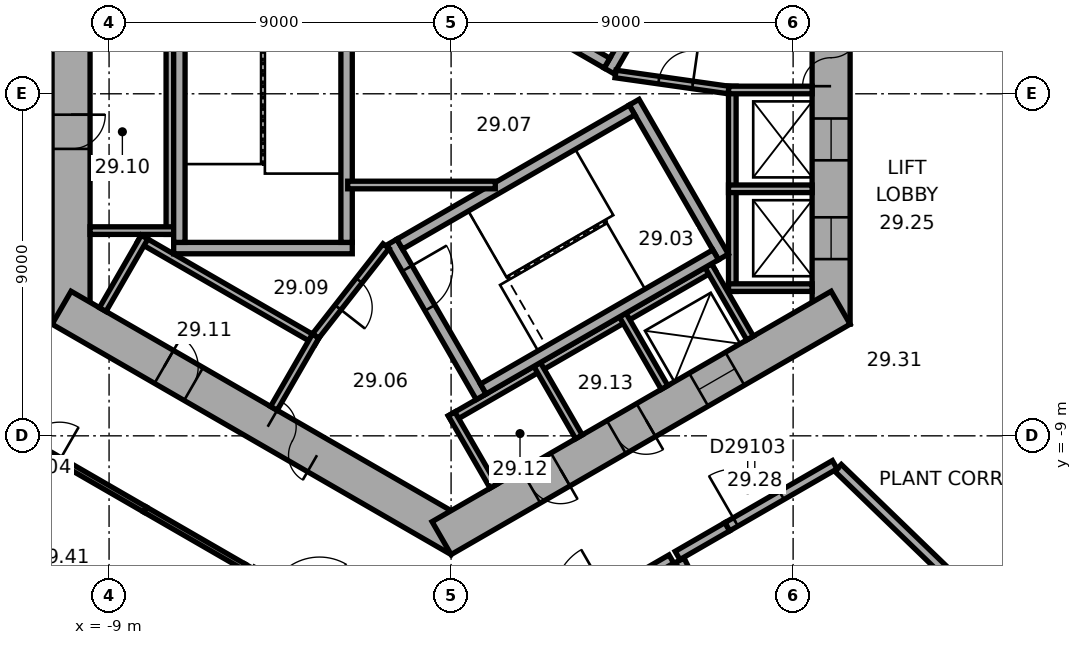
"""IFC4 building model, lengths in metres.
Left out: names, types, materials, properties, quantities, classifications, styles, units other than length and angle.
Written with IfcOpenShell. Run it as: python <this file> out.ifc"""

import sys

from ifc_helpers import new_model, si_unit, direction, frame, frame_2d, origin, place, context, subcontext, project, spatial, rectangle, extrude, element, fill, save


model = new_model("IFC4")
c1 = context("Model", 3, precision=1e-05, world=origin(), true_north=direction((0.0, 1.0)))
c2 = subcontext(c1, "Body", "Model", "MODEL_VIEW")
j1 = project(units=[si_unit("LENGTHUNIT", "METRE"), si_unit("PLANEANGLEUNIT", "RADIAN")], contexts=[c1])
p1 = place(None, origin())
s1 = spatial("IfcSite", under=j1, at=p1, CompositionType="ELEMENT")
p2 = place(p1, origin())
s2 = spatial("IfcBuilding", under=s1, at=p2, CompositionType="ELEMENT")
p3 = place(p2, frame((0.0, 0.0, 119.9)))
s3 = spatial("IfcBuildingStorey", under=s2, at=p3, CompositionType="ELEMENT", Elevation=119.9)
p4 = place(p3, frame((10.0, -6.062, 0.0), z_axis=(0.0, 0.0, 1.0), x_axis=(0.0, 1.0, 0.0)))
e1 = element("IfcWall", 1, at=p4, inside=s3, PredefinedType="SHEAR", context=c2, shape_type="SweptSolid", body=[
    extrude(rectangle(XDim=12.125, YDim=1.0, at=frame_2d((6.062, 0.0))), origin(), (0.0, 0.0, 1.0), 4.5),
])
p5 = place(p4, frame((6.262, 0.0, 0.0)))
e2 = element("IfcOpeningElement", 2, at=p5, cuts=e1, PredefinedType="OPENING", context=c2, shape_type="SweptSolid", body=[
    extrude(rectangle(XDim=1.5, YDim=2.1, at=frame_2d((0.75, 1.05))), frame((0.0, 0.51, 0.0), z_axis=(0.0, -1.0, 0.0), x_axis=(1.0, 0.0, 0.0)), (0.0, 0.0, 1.0), 1.02),
])
p6 = place(p4, frame((1.712, 0.0, 0.0)))
e3 = element("IfcOpeningElement", 3, at=p6, cuts=e1, PredefinedType="OPENING", context=c2, shape_type="SweptSolid", body=[
    extrude(rectangle(XDim=1.1, YDim=2.1, at=frame_2d((0.55, 1.05))), frame((0.0, 0.51, 0.0), z_axis=(0.0, -1.0, 0.0), x_axis=(1.0, 0.0, 0.0)), (0.0, 0.0, 1.0), 1.02),
])
p7 = place(p4, frame((4.312, 0.0, 0.0)))
e4 = element("IfcOpeningElement", 4, at=p7, cuts=e1, PredefinedType="OPENING", context=c2, shape_type="SweptSolid", body=[
    extrude(rectangle(XDim=1.1, YDim=2.1, at=frame_2d((0.55, 1.05))), frame((0.0, 0.51, 0.0), z_axis=(0.0, -1.0, 0.0), x_axis=(1.0, 0.0, 0.0)), (0.0, 0.0, 1.0), 1.02),
])
p8 = place(p3, frame((-10.0, 6.062, 0.0), z_axis=(0.0, 0.0, 1.0), x_axis=(0.0, -1.0, 0.0)))
e5 = element("IfcWall", 5, at=p8, inside=s3, PredefinedType="SHEAR", context=c2, shape_type="SweptSolid", body=[
    extrude(rectangle(XDim=12.125, YDim=1.0, at=frame_2d((6.062, 0.0))), origin(), (0.0, 0.0, 1.0), 4.5),
])
p9 = place(p8, frame((6.612, 0.0, 0.0)))
e6 = element("IfcOpeningElement", 6, at=p9, cuts=e5, PredefinedType="OPENING", context=c2, shape_type="SweptSolid", body=[
    extrude(rectangle(XDim=0.9, YDim=2.1, at=frame_2d((0.45, 1.05))), frame((0.0, 0.51, 0.0), z_axis=(0.0, -1.0, 0.0), x_axis=(1.0, 0.0, 0.0)), (0.0, 0.0, 1.0), 1.02),
])
p10 = place(p3, frame((-10.25, -5.629, 0.0), z_axis=(0.0, 0.0, 1.0), x_axis=(0.866022616891, -0.50000482701, 0.0)))
e7 = element("IfcWall", 7, at=p10, inside=s3, PredefinedType="SHEAR", context=c2, shape_type="SweptSolid", body=[
    extrude(rectangle(XDim=12.125, YDim=1.0, at=frame_2d((6.062, 0.0))), origin(), (0.0, 0.0, 1.0), 4.5),
])
p11 = place(p10, frame((6.262, 0.0, 0.0)))
e8 = element("IfcOpeningElement", 8, at=p11, cuts=e7, PredefinedType="OPENING", context=c2, shape_type="SweptSolid", body=[
    extrude(rectangle(XDim=1.5, YDim=2.1, at=frame_2d((0.75, 1.05))), frame((0.0, 0.51, 0.0), z_axis=(0.0, -1.0, 0.0), x_axis=(1.0, 0.0, 0.0)), (0.0, 0.0, 1.0), 1.02),
])
p12 = place(p10, frame((3.112, 0.0, 0.0)))
e9 = element("IfcOpeningElement", 9, at=p12, cuts=e7, PredefinedType="OPENING", context=c2, shape_type="SweptSolid", body=[
    extrude(rectangle(XDim=0.9, YDim=2.1, at=frame_2d((0.45, 1.05))), frame((0.0, 0.51, 0.0), z_axis=(0.0, -1.0, 0.0), x_axis=(1.0, 0.0, 0.0)), (0.0, 0.0, 1.0), 1.02),
])
p13 = place(p3, frame((-0.25, -11.691, 0.0), z_axis=(0.0, 0.0, 1.0), x_axis=(0.866022616891, 0.50000482701, 0.0)))
e10 = element("IfcWall", 10, at=p13, inside=s3, PredefinedType="SHEAR", context=c2, shape_type="SweptSolid", body=[
    extrude(rectangle(XDim=12.125, YDim=1.0, at=frame_2d((6.062, 0.0))), origin(), (0.0, 0.0, 1.0), 4.5),
])
p14 = place(p13, frame((2.712, 0.0, 0.0)))
e11 = element("IfcOpeningElement", 11, at=p14, cuts=e10, PredefinedType="OPENING", context=c2, shape_type="SweptSolid", body=[
    extrude(rectangle(XDim=0.9, YDim=2.1, at=frame_2d((0.45, 1.05))), frame((0.0, 0.51, 0.0), z_axis=(0.0, -1.0, 0.0), x_axis=(1.0, 0.0, 0.0)), (0.0, 0.0, 1.0), 1.02),
])
p15 = place(p13, frame((5.312, 0.0, 0.0)))
e12 = element("IfcOpeningElement", 12, at=p15, cuts=e10, PredefinedType="OPENING", context=c2, shape_type="SweptSolid", body=[
    extrude(rectangle(XDim=0.9, YDim=2.1, at=frame_2d((0.45, 1.05))), frame((0.0, 0.51, 0.0), z_axis=(0.0, -1.0, 0.0), x_axis=(1.0, 0.0, 0.0)), (0.0, 0.0, 1.0), 1.02),
])
p16 = place(p13, frame((7.812, 0.0, 0.0)))
e13 = element("IfcOpeningElement", 13, at=p16, cuts=e10, PredefinedType="OPENING", context=c2, shape_type="SweptSolid", body=[
    extrude(rectangle(XDim=1.1, YDim=2.1, at=frame_2d((0.55, 1.05))), frame((0.0, 0.51, 0.0), z_axis=(0.0, -1.0, 0.0), x_axis=(1.0, 0.0, 0.0)), (0.0, 0.0, 1.0), 1.02),
])
p17 = place(p3, frame((7.4, -5.2, 0.0), z_axis=(0.0, 0.0, 1.0), x_axis=(0.0, 1.0, 0.0)))
e14 = element("IfcWall", 14, at=p17, inside=s3, PredefinedType="PARTITIONING", context=c2, shape_type="SweptSolid", body=[
    extrude(rectangle(XDim=5.4, YDim=0.2, at=frame_2d((2.7, 0.0))), origin(), (0.0, 0.0, 1.0), 4.22),
])
for number, where, z_axis, x_axis in (
    (15, (7.3, -5.1, 0.0), (0.0, 0.0, 1.0), (1.0, 0.0, 0.0)),
    (16, (7.3, -2.5, 0.0), (0.0, 0.0, 1.0), (1.0, 0.0, 0.0)),
    (17, (7.3, 0.1, 0.0), (0.0, 0.0, 1.0), (1.0, 0.0, 0.0)),
):
    element("IfcWall", number, at=place(p3, frame(where, z_axis=z_axis, x_axis=x_axis)), inside=s3, PredefinedType="PARTITIONING", context=c2, shape_type="SweptSolid", body=[
        extrude(rectangle(XDim=2.2, YDim=0.2, at=frame_2d((1.1, 0.0))), origin(), (0.0, 0.0, 1.0), 4.22),
    ])
p18 = place(p3, frame((-7.4, 4.3, 0.0), z_axis=(0.0, 0.0, 1.0), x_axis=(0.0, -1.0, 0.0)))
e18 = element("IfcWall", 18, at=p18, inside=s3, PredefinedType="PARTITIONING", context=c2, shape_type="SweptSolid", body=[
    extrude(rectangle(XDim=8.0, YDim=0.2, at=frame_2d((4.0, 0.0))), origin(), (0.0, 0.0, 1.0), 4.22),
])
p19 = place(p3, frame((-7.3, -3.6, 0.0), z_axis=(0.0, 0.0, 1.0), x_axis=(-1.0, 0.0, 0.0)))
e19 = element("IfcWall", 19, at=p19, inside=s3, PredefinedType="PARTITIONING", context=c2, shape_type="SweptSolid", body=[
    extrude(rectangle(XDim=2.2, YDim=0.2, at=frame_2d((1.1, 0.0))), origin(), (0.0, 0.0, 1.0), 4.22),
])
p20 = place(p3, frame((-8.203, -3.809, 0.0), z_axis=(0.0, 0.0, 1.0), x_axis=(0.866028230842, -0.499995103361, 0.0)))
e20 = element("IfcWall", 20, at=p20, inside=s3, PredefinedType="PARTITIONING", context=c2, shape_type="SweptSolid", body=[
    extrude(rectangle(XDim=5.4, YDim=0.2, at=frame_2d((2.7, 0.0))), origin(), (0.0, 0.0, 1.0), 4.22),
])
p21 = place(p3, frame((-8.067, -3.772, 0.0), z_axis=(0.0, 0.0, 1.0), x_axis=(-0.50002983664, -0.866008176907, 0.0)))
e21 = element("IfcWall", 21, at=p21, inside=s3, PredefinedType="PARTITIONING", context=c2, shape_type="SweptSolid", body=[
    extrude(rectangle(XDim=2.2, YDim=0.2, at=frame_2d((1.1, 0.0))), origin(), (0.0, 0.0, 1.0), 4.22),
])
p22 = place(p3, frame((-3.563, -6.372, 0.0), z_axis=(0.0, 0.0, 1.0), x_axis=(-0.499994660107, -0.866028486751, 0.0)))
e22 = element("IfcWall", 22, at=p22, inside=s3, PredefinedType="PARTITIONING", context=c2, shape_type="SweptSolid", body=[
    extrude(rectangle(XDim=2.2, YDim=0.2, at=frame_2d((1.1, 0.0))), origin(), (0.0, 0.0, 1.0), 4.22),
])
p23 = place(p3, frame((-0.024, -8.559, 0.0), z_axis=(0.0, 0.0, 1.0), x_axis=(0.866026010844, 0.49999894854, 0.0)))
e23 = element("IfcWall", 23, at=p23, inside=s3, PredefinedType="PARTITIONING", context=c2, shape_type="SweptSolid", body=[
    extrude(rectangle(XDim=8.0, YDim=0.2, at=frame_2d((4.0, 0.0))), origin(), (0.0, 0.0, 1.0), 4.22),
])
for number, where, z_axis, x_axis in (
    (24, (0.013, -8.422, 0.0), (0.0, 0.0, 1.0), (0.5, -0.866, 0.0)),
    (25, (2.264, -7.122, 0.0), (0.0, 0.0, 1.0), (0.5, -0.866, 0.0)),
    (26, (4.516, -5.822, 0.0), (0.0, 0.0, 1.0), (0.5, -0.866, 0.0)),
    (27, (6.768, -4.522, 0.0), (0.0, 0.0, 1.0), (0.5, -0.866, 0.0)),
):
    element("IfcWall", number, at=place(p3, frame(where, z_axis=z_axis, x_axis=x_axis)), inside=s3, PredefinedType="PARTITIONING", context=c2, shape_type="SweptSolid", body=[
        extrude(rectangle(XDim=2.2, YDim=0.2, at=frame_2d((1.1, 0.0))), origin(), (0.0, 0.0, 1.0), 4.22),
    ])
p24 = place(p3, frame((4.158, 0.602, 0.0), z_axis=(0.0, 0.0, 1.0), x_axis=(0.499977259774, 0.866038532462, 0.0)))
e28 = element("IfcWall", 28, at=p24, inside=s3, PredefinedType="SHEAR", context=c2, shape_type="SweptSolid", body=[
    extrude(rectangle(XDim=4.7, YDim=0.3, at=frame_2d((2.35, 0.0))), origin(), (0.0, 0.0, 1.0), 4.22),
])
p25 = place(p24, frame((0.8, 0.0, 0.0)))
e29 = element("IfcOpeningElement", 29, at=p25, cuts=e28, PredefinedType="OPENING", context=c2, shape_type="SweptSolid", body=[
    extrude(rectangle(XDim=1.2, YDim=2.1, at=frame_2d((0.6, 1.05))), frame((0.0, 0.16, 0.0), z_axis=(0.0, -1.0, 0.0), x_axis=(1.0, 0.0, 0.0)), (0.0, 0.0, 1.0), 0.32),
])
p26 = place(p3, frame((4.103, 0.807, 0.0), z_axis=(0.0, 0.0, 1.0), x_axis=(-0.866027801685, 0.499995846692, 0.0)))
e30 = element("IfcWall", 30, at=p26, inside=s3, PredefinedType="SHEAR", context=c2, shape_type="SweptSolid", body=[
    extrude(rectangle(XDim=7.06, YDim=0.3, at=frame_2d((3.53, 0.0))), origin(), (0.0, 0.0, 1.0), 4.22),
])
p27 = place(p3, frame((-2.6, -4.06, 0.0), z_axis=(0.0, 0.0, 1.0), x_axis=(-1.0, 0.0, 0.0)))
e31 = element("IfcWall", 31, at=p27, inside=s3, PredefinedType="SHEAR", context=c2, shape_type="SweptSolid", body=[
    extrude(rectangle(XDim=4.7, YDim=0.3, at=frame_2d((2.35, 0.0))), origin(), (0.0, 0.0, 1.0), 4.22),
])
for number, where, z_axis, x_axis in (
    (32, (-2.75, 3.15, 0.0), (0.0, 0.0, 1.0), (0.0, -1.0, 0.0)),
    (33, (-7.15, 3.15, 0.0), (0.0, 0.0, 1.0), (0.0, -1.0, 0.0)),
):
    element("IfcWall", number, at=place(p3, frame(where, z_axis=z_axis, x_axis=x_axis)), inside=s3, PredefinedType="SHEAR", context=c2, shape_type="SweptSolid", body=[
        extrude(rectangle(XDim=7.06, YDim=0.3, at=frame_2d((3.53, 0.0))), origin(), (0.0, 0.0, 1.0), 4.22),
    ])
p28 = place(p3, frame((-1.558, -3.902, 0.0), z_axis=(0.0, 0.0, 1.0), x_axis=(0.499977259774, -0.866038532462, 0.0)))
e34 = element("IfcWall", 34, at=p28, inside=s3, PredefinedType="SHEAR", context=c2, shape_type="SweptSolid", body=[
    extrude(rectangle(XDim=4.7, YDim=0.3, at=frame_2d((2.35, 0.0))), origin(), (0.0, 0.0, 1.0), 4.22),
])
p29 = place(p28, frame((0.8, 0.0, 0.0)))
e35 = element("IfcOpeningElement", 35, at=p29, cuts=e34, PredefinedType="OPENING", context=c2, shape_type="SweptSolid", body=[
    extrude(rectangle(XDim=1.2, YDim=2.1, at=frame_2d((0.6, 1.05))), frame((0.0, 0.16, 0.0), z_axis=(0.0, -1.0, 0.0), x_axis=(1.0, 0.0, 0.0)), (0.0, 0.0, 1.0), 0.32),
])
p30 = place(p3, frame((4.816, -0.222, 0.0), z_axis=(0.0, 0.0, 1.0), x_axis=(0.499977259774, -0.866038532462, 0.0)))
e36 = element("IfcWall", 36, at=p30, inside=s3, PredefinedType="SHEAR", context=c2, shape_type="SweptSolid", body=[
    extrude(rectangle(XDim=4.7, YDim=0.3, at=frame_2d((2.35, 0.0))), origin(), (0.0, 0.0, 1.0), 4.22),
])
for number, where, z_axis, x_axis in (
    (37, (-1.353, -3.957, 0.0), (0.0, 0.0, 1.0), (0.866, 0.5, 0.0)),
    (38, (0.847, -7.767, 0.0), (0.0, 0.0, 1.0), (0.866, 0.5, 0.0)),
):
    element("IfcWall", number, at=place(p3, frame(where, z_axis=z_axis, x_axis=x_axis)), inside=s3, PredefinedType="SHEAR", context=c2, shape_type="SweptSolid", body=[
        extrude(rectangle(XDim=7.06, YDim=0.3, at=frame_2d((3.53, 0.0))), origin(), (0.0, 0.0, 1.0), 4.22),
    ])
p31 = place(p3, frame((4.327, 0.521, 0.0), z_axis=(0.0, 0.0, 1.0), x_axis=(0.990124376366, -0.14019172346, 0.0)))
e39 = element("IfcWall", 39, at=p31, inside=s3, PredefinedType="PARTITIONING", context=c2, shape_type="SweptSolid", body=[
    extrude(rectangle(XDim=3.002, YDim=0.2, at=frame_2d((1.501, 0.0))), origin(), (0.0, 0.0, 1.0), 4.22),
])
p32 = place(p31, frame((1.15, 0.0, 0.0)))
e40 = element("IfcOpeningElement", 40, at=p32, cuts=e39, PredefinedType="OPENING", context=c2, shape_type="SweptSolid", body=[
    extrude(rectangle(XDim=0.9, YDim=2.1, at=frame_2d((0.45, 1.05))), frame((0.0, 0.11, 0.0), z_axis=(0.0, -1.0, 0.0), x_axis=(1.0, 0.0, 0.0)), (0.0, 0.0, 1.0), 0.22),
])
p33 = place(p3, frame((-1.712, -4.008, 0.0), z_axis=(0.0, 0.0, 1.0), x_axis=(-0.616549420702, -0.787316208287, 0.0)))
e41 = element("IfcWall", 41, at=p33, inside=s3, PredefinedType="PARTITIONING", context=c2, shape_type="SweptSolid", body=[
    extrude(rectangle(XDim=3.002, YDim=0.2, at=frame_2d((1.501, 0.0))), origin(), (0.0, 0.0, 1.0), 4.22),
])
p34 = place(p33, frame((1.15, 0.0, 0.0)))
e42 = element("IfcOpeningElement", 42, at=p34, cuts=e41, PredefinedType="OPENING", context=c2, shape_type="SweptSolid", body=[
    extrude(rectangle(XDim=0.9, YDim=2.1, at=frame_2d((0.45, 1.05))), frame((0.0, 0.11, 0.0), z_axis=(0.0, -1.0, 0.0), x_axis=(1.0, 0.0, 0.0)), (0.0, 0.0, 1.0), 0.22),
])
p35 = place(p3, frame((-2.72, -2.4, 0.0), z_axis=(0.0, 0.0, 1.0), x_axis=(1.0, 0.0, 0.0)))
e43 = element("IfcWall", 43, at=p35, inside=s3, PredefinedType="PARTITIONING", context=c2, shape_type="SweptSolid", body=[
    extrude(rectangle(XDim=3.883, YDim=0.2, at=frame_2d((1.941, 0.0))), origin(), (0.0, 0.0, 1.0), 4.22),
])
p36 = place(p3, frame((-7.143, -16.776, 0.0), z_axis=(0.0, 0.0, 1.0), x_axis=(-0.866010407637, 0.500025973189, 0.0)))
e44 = element("IfcWall", 44, at=p36, inside=s3, PredefinedType="SOLIDWALL", context=c2, shape_type="SweptSolid", body=[
    extrude(rectangle(XDim=9.376, YDim=0.25, at=frame_2d((4.688, 0.0))), origin(), (0.0, 0.0, 1.0), 4.22),
])
p37 = place(p3, frame((7.989, -16.287, 0.0), z_axis=(0.0, 0.0, 1.0), x_axis=(-0.440340265272, 0.89783097005, 0.0)))
e45 = element("IfcWall", 45, at=p37, inside=s3, PredefinedType="SOLIDWALL", context=c2, shape_type="SweptSolid", body=[
    extrude(rectangle(XDim=4.47, YDim=0.25, at=frame_2d((2.235, 0.0))), origin(), (0.0, 0.0, 1.0), 3.2),
])
p38 = place(p3, frame((15.101, -14.598, 0.0), z_axis=(0.0, 0.0, 1.0), x_axis=(-0.718943789633, 0.695068217766, 0.0)))
e46 = element("IfcWall", 46, at=p38, inside=s3, PredefinedType="SOLIDWALL", context=c2, shape_type="SweptSolid", body=[
    extrude(rectangle(XDim=6.841, YDim=0.25, at=frame_2d((3.42, 0.0))), origin(), (0.0, 0.0, 1.0), 3.2),
])
p39 = place(p3, frame((-5.238, -12.564, 0.0), z_axis=(0.0, 0.0, 1.0), x_axis=(-0.866234801039, 0.4996371378, 0.0)))
e47 = element("IfcWall", 47, at=p39, inside=s3, PredefinedType="PARTITIONING", context=c2, shape_type="SweptSolid", body=[
    extrude(rectangle(XDim=0.248, YDim=0.15, at=frame_2d((0.124, 0.0))), origin(), (0.0, 0.0, 1.0), 4.22),
])
p40 = place(p3, frame((-5.452, -12.441, 0.0), z_axis=(0.0, 0.0, 1.0), x_axis=(-0.866037998184, 0.499978185225, 0.0)))
e48 = element("IfcWall", 48, at=p40, inside=s3, PredefinedType="PARTITIONING", context=c2, shape_type="SweptSolid", body=[
    extrude(rectangle(XDim=3.003, YDim=0.15, at=frame_2d((1.501, 0.0))), origin(), (0.0, 0.0, 1.0), 4.22),
])
p41 = place(p3, frame((5.797, -12.241, 0.0), z_axis=(0.0, 0.0, 1.0), x_axis=(-0.865955892764, -0.500120377296, 0.0)))
e49 = element("IfcWall", 49, at=p41, inside=s3, PredefinedType="SOLIDWALL", context=c2, shape_type="SweptSolid", body=[
    extrude(rectangle(XDim=1.682, YDim=0.25, at=frame_2d((0.841, 0.0))), origin(), (0.0, 0.0, 1.0), 4.22),
])
p42 = place(p3, frame((5.958, -12.148, 0.0), z_axis=(0.0, 0.0, 1.0), x_axis=(0.866080830997, 0.499903984961, 0.0)))
e50 = element("IfcWall", 50, at=p42, inside=s3, PredefinedType="SOLIDWALL", context=c2, shape_type="SweptSolid", body=[
    extrude(rectangle(XDim=1.513, YDim=0.25, at=frame_2d((0.757, 0.0))), origin(), (0.0, 0.0, 1.0), 4.22),
])
p43 = place(p3, frame((7.269, -11.391, 0.0), z_axis=(0.0, 0.0, 1.0), x_axis=(0.866043587326, 0.49996850386, 0.0)))
e51 = element("IfcWall", 51, at=p43, inside=s3, PredefinedType="SOLIDWALL", context=c2, shape_type="SweptSolid", body=[
    extrude(rectangle(XDim=3.264, YDim=0.25, at=frame_2d((1.632, 0.0))), origin(), (0.0, 0.0, 1.0), 4.22),
])
p44 = place(p43, frame((0.25, 0.0, 0.0)))
e52 = element("IfcOpeningElement", 52, at=p44, cuts=e51, PredefinedType="OPENING", context=c2, shape_type="SweptSolid", body=[
    extrude(rectangle(XDim=1.4, YDim=2.1, at=frame_2d((0.7, 1.05))), frame((0.0, 0.135, 0.0), z_axis=(0.0, -1.0, 0.0), x_axis=(1.0, 0.0, 0.0)), (0.0, 0.0, 1.0), 0.27),
])
p45 = place(p3, frame((-8.052, -10.939, 0.0), z_axis=(0.0, 0.0, 1.0), x_axis=(-0.865989037086, 0.500062983681, 0.0)))
e53 = element("IfcWall", 53, at=p45, inside=s3, PredefinedType="PARTITIONING", context=c2, shape_type="SweptSolid", body=[
    extrude(rectangle(XDim=3.848, YDim=0.15, at=frame_2d((1.924, 0.0))), origin(), (0.0, 0.0, 1.0), 4.22),
])
p46 = place(p45, frame((2.598, 0.0, 0.0)))
e54 = element("IfcOpeningElement", 54, at=p46, cuts=e53, PredefinedType="OPENING", context=c2, shape_type="SweptSolid", body=[
    extrude(rectangle(XDim=1.0, YDim=2.1, at=frame_2d((0.5, 1.05))), frame((0.0, 0.085, 0.0), z_axis=(0.0, -1.0, 0.0), x_axis=(1.0, 0.0, 0.0)), (0.0, 0.0, 1.0), 0.17),
])
p47 = place(p5, origin())
e55 = element("IfcDoor", 55, at=p47, inside=s3, OperationType="DOUBLE_DOOR_SINGLE_SWING", PredefinedType="DOOR", context=c2, shape_type="SweptSolid", body=[
    extrude(rectangle(XDim=1.5, YDim=2.1, at=frame_2d((0.75, 1.05))), frame((0.0, 0.025, 0.0), z_axis=(0.0, -1.0, 0.0), x_axis=(1.0, 0.0, 0.0)), (0.0, 0.0, 1.0), 0.05),
])
fill(e2, e55)
p48 = place(p11, origin())
e56 = element("IfcDoor", 56, at=p48, inside=s3, OperationType="DOUBLE_DOOR_SINGLE_SWING", PredefinedType="DOOR", context=c2, shape_type="SweptSolid", body=[
    extrude(rectangle(XDim=1.5, YDim=2.1, at=frame_2d((0.75, 1.05))), frame((0.0, 0.025, 0.0), z_axis=(0.0, -1.0, 0.0), x_axis=(1.0, 0.0, 0.0)), (0.0, 0.0, 1.0), 0.05),
])
fill(e8, e56)
p49 = place(p29, origin())
e57 = element("IfcDoor", 57, at=p49, inside=s3, OperationType="SINGLE_SWING_RIGHT", PredefinedType="DOOR", context=c2, shape_type="SweptSolid", body=[
    extrude(rectangle(XDim=1.2, YDim=2.1, at=frame_2d((0.6, 1.05))), frame((0.0, 0.025, 0.0), z_axis=(0.0, -1.0, 0.0), x_axis=(1.0, 0.0, 0.0)), (0.0, 0.0, 1.0), 0.05),
])
fill(e35, e57)
p50 = place(p32, origin())
e58 = element("IfcDoor", 58, at=p50, inside=s3, OperationType="SINGLE_SWING_LEFT", PredefinedType="DOOR", context=c2, shape_type="SweptSolid", body=[
    extrude(rectangle(XDim=0.9, YDim=2.1, at=frame_2d((0.45, 1.05))), frame((0.0, 0.025, 0.0), z_axis=(0.0, -1.0, 0.0), x_axis=(1.0, 0.0, 0.0)), (0.0, 0.0, 1.0), 0.05),
])
fill(e40, e58)
p51 = place(p34, origin())
e59 = element("IfcDoor", 59, at=p51, inside=s3, OperationType="SINGLE_SWING_LEFT", PredefinedType="DOOR", context=c2, shape_type="SweptSolid", body=[
    extrude(rectangle(XDim=0.9, YDim=2.1, at=frame_2d((0.45, 1.05))), frame((0.0, 0.025, 0.0), z_axis=(0.0, -1.0, 0.0), x_axis=(1.0, 0.0, 0.0)), (0.0, 0.0, 1.0), 0.05),
])
fill(e42, e59)
p52 = place(p9, origin())
e60 = element("IfcDoor", 60, at=p52, inside=s3, OperationType="SINGLE_SWING_LEFT", PredefinedType="DOOR", context=c2, shape_type="SweptSolid", body=[
    extrude(rectangle(XDim=0.9, YDim=2.1, at=frame_2d((0.45, 1.05))), frame((0.0, 0.025, 0.0), z_axis=(0.0, -1.0, 0.0), x_axis=(1.0, 0.0, 0.0)), (0.0, 0.0, 1.0), 0.05),
])
fill(e6, e60)
p53 = place(p12, origin())
e61 = element("IfcDoor", 61, at=p53, inside=s3, OperationType="SINGLE_SWING_LEFT", PredefinedType="DOOR", context=c2, shape_type="SweptSolid", body=[
    extrude(rectangle(XDim=0.9, YDim=2.1, at=frame_2d((0.45, 1.05))), frame((0.0, 0.025, 0.0), z_axis=(0.0, -1.0, 0.0), x_axis=(1.0, 0.0, 0.0)), (0.0, 0.0, 1.0), 0.05),
])
fill(e9, e61)
p54 = place(p14, origin())
e62 = element("IfcDoor", 62, at=p54, inside=s3, OperationType="SINGLE_SWING_LEFT", PredefinedType="DOOR", context=c2, shape_type="SweptSolid", body=[
    extrude(rectangle(XDim=0.9, YDim=2.1, at=frame_2d((0.45, 1.05))), frame((0.0, 0.025, 0.0), z_axis=(0.0, -1.0, 0.0), x_axis=(1.0, 0.0, 0.0)), (0.0, 0.0, 1.0), 0.05),
])
fill(e11, e62)
p55 = place(p15, origin())
e63 = element("IfcDoor", 63, at=p55, inside=s3, OperationType="SINGLE_SWING_LEFT", PredefinedType="DOOR", context=c2, shape_type="SweptSolid", body=[
    extrude(rectangle(XDim=0.9, YDim=2.1, at=frame_2d((0.45, 1.05))), frame((0.0, 0.025, 0.0), z_axis=(0.0, -1.0, 0.0), x_axis=(1.0, 0.0, 0.0)), (0.0, 0.0, 1.0), 0.05),
])
fill(e12, e63)
p56 = place(p6, origin())
e64 = element("IfcDoor", 64, at=p56, inside=s3, OperationType="DOUBLE_DOOR_SLIDING", PredefinedType="DOOR", context=c2, shape_type="SweptSolid", body=[
    extrude(rectangle(XDim=1.1, YDim=2.1, at=frame_2d((0.55, 1.05))), frame((0.0, 0.025, 0.0), z_axis=(0.0, -1.0, 0.0), x_axis=(1.0, 0.0, 0.0)), (0.0, 0.0, 1.0), 0.05),
])
fill(e3, e64)
p57 = place(p7, origin())
e65 = element("IfcDoor", 65, at=p57, inside=s3, OperationType="DOUBLE_DOOR_SLIDING", PredefinedType="DOOR", context=c2, shape_type="SweptSolid", body=[
    extrude(rectangle(XDim=1.1, YDim=2.1, at=frame_2d((0.55, 1.05))), frame((0.0, 0.025, 0.0), z_axis=(0.0, -1.0, 0.0), x_axis=(1.0, 0.0, 0.0)), (0.0, 0.0, 1.0), 0.05),
])
fill(e4, e65)
p58 = place(p16, origin())
e66 = element("IfcDoor", 66, at=p58, inside=s3, OperationType="DOUBLE_DOOR_SLIDING", PredefinedType="DOOR", context=c2, shape_type="SweptSolid", body=[
    extrude(rectangle(XDim=1.1, YDim=2.1, at=frame_2d((0.55, 1.05))), frame((0.0, 0.025, 0.0), z_axis=(0.0, -1.0, 0.0), x_axis=(1.0, 0.0, 0.0)), (0.0, 0.0, 1.0), 0.05),
])
fill(e13, e66)
p59 = place(p44, origin())
e67 = element("IfcDoor", 67, at=p59, inside=s3, OperationType="SINGLE_SWING_LEFT", PredefinedType="DOOR", context=c2, shape_type="SweptSolid", body=[
    extrude(rectangle(XDim=1.4, YDim=2.1, at=frame_2d((0.7, 1.05))), frame((0.0, 0.025, 0.0), z_axis=(0.0, -1.0, 0.0), x_axis=(1.0, 0.0, 0.0)), (0.0, 0.0, 1.0), 0.05),
])
fill(e52, e67)
p60 = place(p46, origin())
e68 = element("IfcDoor", 68, at=p60, inside=s3, OperationType="SINGLE_SWING_LEFT", PredefinedType="DOOR", context=c2, shape_type="SweptSolid", body=[
    extrude(rectangle(XDim=1.0, YDim=2.1, at=frame_2d((0.5, 1.05))), frame((0.0, 0.025, 0.0), z_axis=(0.0, -1.0, 0.0), x_axis=(1.0, 0.0, 0.0)), (0.0, 0.0, 1.0), 0.05),
])
fill(e54, e68)
save(model, sys.argv[1])
